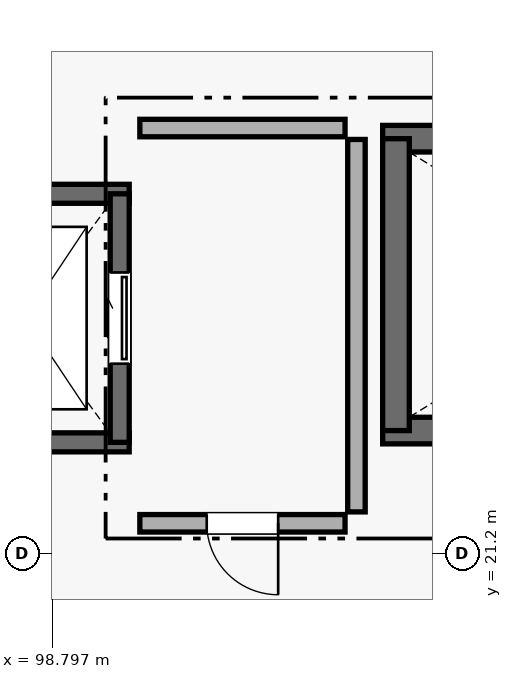
"""IFC4 building model, lengths in metres.
Left out: names, types, materials, properties, quantities, classifications, styles, units other than length and angle.
Written with IfcOpenShell. Run it as: python <this file> out.ifc"""

import sys

from ifc_helpers import new_model, si_unit, direction, frame, frame_2d, origin, place, context, subcontext, project, spatial, rectangle, extrude, element, fill, save


model = new_model("IFC4")
c1 = context("Model", 3, precision=1e-05, world=origin(), true_north=direction((0.0, 1.0)))
c2 = subcontext(c1, "Body", "Model", "MODEL_VIEW")
j1 = project(units=[si_unit("LENGTHUNIT", "METRE"), si_unit("PLANEANGLEUNIT", "RADIAN")], contexts=[c1])
p1 = place(None, origin())
s1 = spatial("IfcSite", under=j1, at=p1, CompositionType="ELEMENT")
p2 = place(p1, origin())
s2 = spatial("IfcBuilding", under=s1, at=p2, CompositionType="ELEMENT")
p3 = place(p2, frame((0.0, 0.0, 28.8)))
s3 = spatial("IfcBuildingStorey", under=s2, at=p3, CompositionType="ELEMENT", Elevation=28.8)
for number, where, z_axis, x_axis in (
    (1, (111.155, 22.82, 0.0), (0.0, 0.0, 1.0), (-1.0, 0.0, 0.0)),
    (2, (103.145, 26.66, 0.0), (0.0, 0.0, 1.0), (1.0, 0.0, 0.0)),
):
    element("IfcWall", number, at=place(p3, frame(where, z_axis=z_axis, x_axis=x_axis)), inside=s3, PredefinedType="SHEAR", context=c2, shape_type="SweptSolid", body=[
        extrude(rectangle(XDim=8.01, YDim=0.35, at=frame_2d((4.005, 0.0))), origin(), (0.0, 0.0, 1.0), 4.23),
    ])
p4 = place(p3, frame((103.32, 22.82, 0.0), z_axis=(0.0, 0.0, 1.0), x_axis=(0.0, 1.0, 0.0)))
e3 = element("IfcWall", 3, at=p4, inside=s3, PredefinedType="SHEAR", context=c2, shape_type="SweptSolid", body=[
    extrude(rectangle(XDim=3.84, YDim=0.35, at=frame_2d((1.92, 0.0))), origin(), (0.0, 0.0, 1.0), 4.23),
])
for number, where, z_axis, x_axis in (
    (4, (99.81, 22.665, 0.0), (0.0, 0.0, 1.0), (-1.0, 0.0, 0.0)),
    (5, (97.09, 25.935, 0.0), (0.0, 0.0, 1.0), (1.0, 0.0, 0.0)),
):
    element("IfcWall", number, at=place(p3, frame(where, z_axis=z_axis, x_axis=x_axis)), inside=s3, PredefinedType="SHEAR", context=c2, shape_type="SweptSolid", body=[
        extrude(rectangle(XDim=2.72, YDim=0.25, at=frame_2d((1.36, 0.0))), origin(), (0.0, 0.0, 1.0), 4.23),
    ])
p5 = place(p3, frame((99.685, 25.935, 0.0), z_axis=(0.0, 0.0, 1.0), x_axis=(0.0, -1.0, 0.0)))
e6 = element("IfcWall", 6, at=p5, inside=s3, PredefinedType="SHEAR", context=c2, shape_type="SweptSolid", body=[
    extrude(rectangle(XDim=3.27, YDim=0.25, at=frame_2d((1.635, 0.0))), origin(), (0.0, 0.0, 1.0), 4.23),
])
p6 = place(p5, frame((1.035, 0.0, 0.0)))
e7 = element("IfcOpeningElement", 7, at=p6, cuts=e6, PredefinedType="OPENING", context=c2, shape_type="SweptSolid", body=[
    extrude(rectangle(XDim=1.2, YDim=2.25, at=frame_2d((0.6, 1.125))), frame((0.0, 0.135, 0.0), z_axis=(0.0, -1.0, 0.0), x_axis=(1.0, 0.0, 0.0)), (0.0, 0.0, 1.0), 0.27),
])
p7 = place(p3, frame((102.65, 21.6, 0.0), z_axis=(0.0, 0.0, 1.0), x_axis=(-1.0, 0.0, 0.0)))
e8 = element("IfcWall", 8, at=p7, inside=s3, PredefinedType="PARTITIONING", context=c2, shape_type="SweptSolid", body=[
    extrude(rectangle(XDim=2.7, YDim=0.23, at=frame_2d((1.35, 0.0))), origin(), (0.0, 0.0, 1.0), 2.98),
])
p8 = place(p7, frame((0.88, 0.0, 0.0)))
e9 = element("IfcOpeningElement", 9, at=p8, cuts=e8, PredefinedType="OPENING", context=c2, shape_type="SweptSolid", body=[
    extrude(rectangle(XDim=0.94, YDim=2.12, at=frame_2d((0.47, 1.06))), frame((0.0, 0.125, 0.0), z_axis=(0.0, -1.0, 0.0), x_axis=(1.0, 0.0, 0.0)), (0.0, 0.0, 1.0), 0.25),
])
p9 = place(p3, frame((99.95, 26.8, 0.0), z_axis=(0.0, 0.0, 1.0), x_axis=(1.0, 0.0, 0.0)))
e10 = element("IfcWall", 10, at=p9, inside=s3, PredefinedType="PARTITIONING", context=c2, shape_type="SweptSolid", body=[
    extrude(rectangle(XDim=2.7, YDim=0.23, at=frame_2d((1.35, 0.0))), origin(), (0.0, 0.0, 1.0), 2.98),
])
p10 = place(p3, frame((102.8, 26.65, 0.0), z_axis=(0.0, 0.0, 1.0), x_axis=(0.0, -1.0, 0.0)))
e11 = element("IfcWall", 11, at=p10, inside=s3, PredefinedType="PARTITIONING", context=c2, shape_type="SweptSolid", body=[
    extrude(rectangle(XDim=4.9, YDim=0.23, at=frame_2d((2.45, 0.0))), origin(), (0.0, 0.0, 1.0), 2.98),
])
p11 = place(p6, origin())
e12 = element("IfcDoor", 12, at=p11, inside=s3, OperationType="SLIDING_TO_LEFT", PredefinedType="DOOR", context=c2, shape_type="SweptSolid", body=[
    extrude(rectangle(XDim=1.2, YDim=2.25, at=frame_2d((0.6, 1.125))), frame((0.0, 0.025, 0.0), z_axis=(0.0, -1.0, 0.0), x_axis=(1.0, 0.0, 0.0)), (0.0, 0.0, 1.0), 0.05),
])
fill(e7, e12)
p12 = place(p8, origin())
e13 = element("IfcDoor", 13, at=p12, inside=s3, OperationType="SINGLE_SWING_LEFT", PredefinedType="DOOR", context=c2, shape_type="SweptSolid", body=[
    extrude(rectangle(XDim=0.94, YDim=2.12, at=frame_2d((0.47, 1.06))), frame((0.0, 0.025, 0.0), z_axis=(0.0, -1.0, 0.0), x_axis=(1.0, 0.0, 0.0)), (0.0, 0.0, 1.0), 0.05),
])
fill(e9, e13)
save(model, sys.argv[1])
